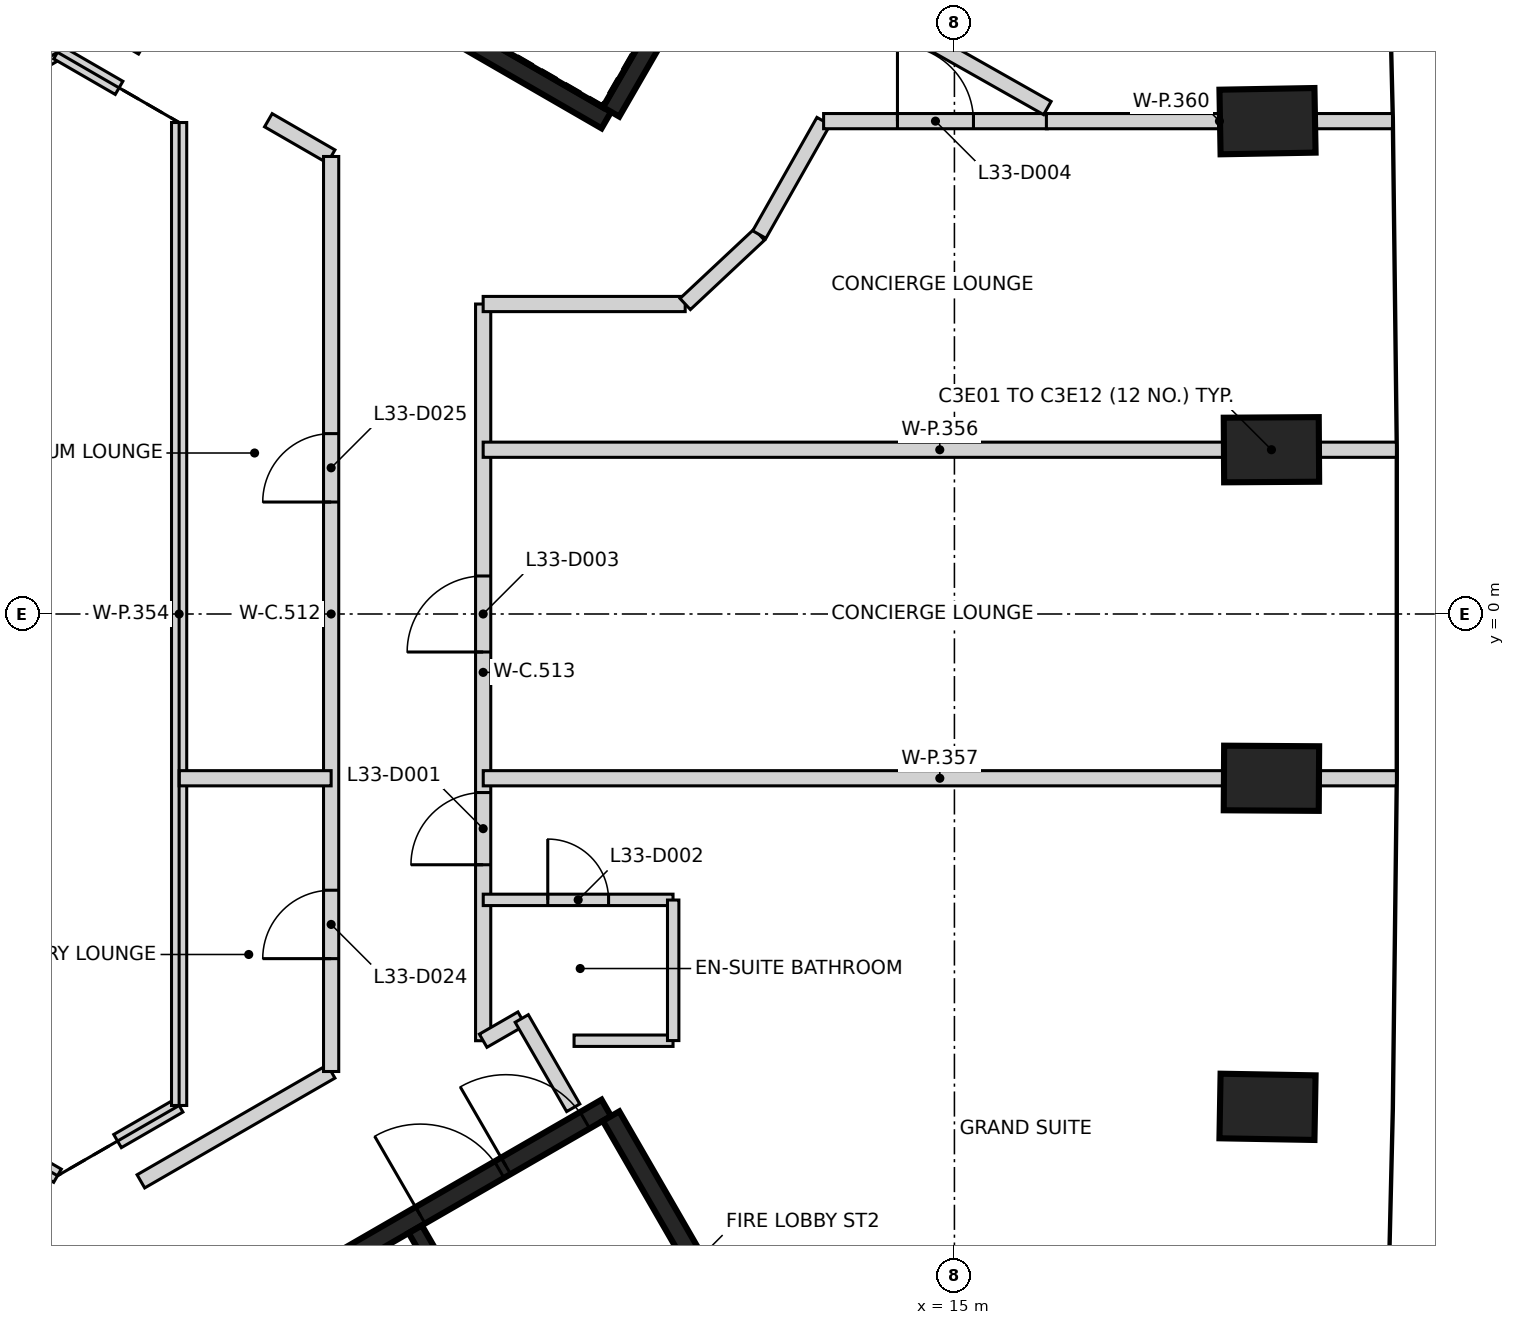
"""IFC4 building model, lengths in metres.
Left out: names, types, materials, properties, quantities, classifications, styles, units other than length and angle.
Written with IfcOpenShell. Run it as: python <this file> out.ifc"""

import sys

from ifc_helpers import new_model, si_unit, direction, frame, frame_2d, origin, origin_2d, place, context, subcontext, project, spatial, rectangle, extrude, element, fill, save


model = new_model("IFC4")
c1 = context("Model", 3, precision=1e-05, world=origin(), true_north=direction((0.0, 1.0)))
c2 = subcontext(c1, "Body", "Model", "MODEL_VIEW")
j1 = project(units=[si_unit("LENGTHUNIT", "METRE"), si_unit("PLANEANGLEUNIT", "RADIAN")], contexts=[c1])
p1 = place(None, origin())
s1 = spatial("IfcSite", under=j1, at=p1, CompositionType="ELEMENT")
p2 = place(p1, origin())
s2 = spatial("IfcBuilding", under=s1, at=p2, CompositionType="ELEMENT")
p3 = place(p2, frame((0.0, 0.0, 136.0)))
s3 = spatial("IfcBuildingStorey", under=s2, at=p3, CompositionType="ELEMENT", Elevation=136.0)
for number, where, z_axis, x_axis in (
    (1, (19.119, -6.484, -0.4), (0.0, 0.0, 1.0), (-1.0, 0.018, 0.0)),
    (2, (19.171, -2.161, -0.4), (0.0, 0.0, 1.0), (-1.0, 0.006, 0.0)),
    (3, (19.171, 2.161, -0.4), (0.0, 0.0, 1.0), (1.0, 0.006, 0.0)),
    (4, (19.119, 6.484, -0.4), (0.0, 0.0, 1.0), (1.0, 0.018, 0.0)),
):
    element("IfcColumn", number, at=place(p3, frame(where, z_axis=z_axis, x_axis=x_axis)), inside=s3, PredefinedType="COLUMN", context=c2, shape_type="SweptSolid", body=[
        extrude(rectangle(XDim=1.25, YDim=0.85, at=origin_2d()), origin(), (0.0, 0.0, 1.0), 3.6),
    ])
p4 = place(p3, frame((10.42, 6.498, 0.0), z_axis=(0.0, 0.0, 1.0), x_axis=(-0.866021906294, 0.500006057782, 0.0)))
e5 = element("IfcWall", 5, at=p4, inside=s3, PredefinedType="SHEAR", context=c2, shape_type="SweptSolid", body=[
    extrude(rectangle(XDim=11.55, YDim=0.25, at=frame_2d((5.775, 0.0))), origin(), (0.0, 0.0, 1.0), 3.2),
])
p5 = place(p4, frame((10.025, 0.0, 0.0)))
e6 = element("IfcOpeningElement", 6, at=p5, cuts=e5, PredefinedType="OPENING", context=c2, shape_type="SweptSolid", body=[
    extrude(rectangle(XDim=1.2, YDim=2.1, at=frame_2d((0.6, 1.05))), frame((0.0, 0.135, 0.0), z_axis=(0.0, -1.0, 0.0), x_axis=(1.0, 0.0, 0.0)), (0.0, 0.0, 1.0), 0.27),
])
p6 = place(p4, frame((8.725, 0.0, 0.0)))
e7 = element("IfcOpeningElement", 7, at=p6, cuts=e5, PredefinedType="OPENING", context=c2, shape_type="SweptSolid", body=[
    extrude(rectangle(XDim=1.2, YDim=2.1, at=frame_2d((0.6, 1.05))), frame((0.0, 0.135, 0.0), z_axis=(0.0, -1.0, 0.0), x_axis=(1.0, 0.0, 0.0)), (0.0, 0.0, 1.0), 0.27),
])
p7 = place(p3, frame((13.238, 11.378, 0.0), z_axis=(0.0, 0.0, 1.0), x_axis=(-0.500008851346, -0.866020293397, 0.0)))
e8 = element("IfcWall", 8, at=p7, inside=s3, PredefinedType="SHEAR", context=c2, shape_type="SweptSolid", body=[
    extrude(rectangle(XDim=5.51, YDim=0.25, at=frame_2d((2.755, 0.0))), origin(), (0.0, 0.0, 1.0), 3.2),
])
p8 = place(p3, frame((0.417, -12.273, 0.0), z_axis=(0.0, 0.0, 1.0), x_axis=(0.866021906294, 0.500006057782, 0.0)))
e9 = element("IfcWall", 9, at=p8, inside=s3, PredefinedType="SHEAR", context=c2, shape_type="SweptSolid", body=[
    extrude(rectangle(XDim=11.55, YDim=0.25, at=frame_2d((5.775, 0.0))), origin(), (0.0, 0.0, 1.0), 3.2),
])
p9 = place(p8, frame((10.025, 0.0, 0.0)))
e10 = element("IfcOpeningElement", 10, at=p9, cuts=e9, PredefinedType="OPENING", context=c2, shape_type="SweptSolid", body=[
    extrude(rectangle(XDim=1.2, YDim=2.1, at=frame_2d((0.6, 1.05))), frame((0.0, 0.135, 0.0), z_axis=(0.0, -1.0, 0.0), x_axis=(1.0, 0.0, 0.0)), (0.0, 0.0, 1.0), 0.27),
])
p10 = place(p8, frame((8.725, 0.0, 0.0)))
e11 = element("IfcOpeningElement", 11, at=p10, cuts=e9, PredefinedType="OPENING", context=c2, shape_type="SweptSolid", body=[
    extrude(rectangle(XDim=1.2, YDim=2.1, at=frame_2d((0.6, 1.05))), frame((0.0, 0.135, 0.0), z_axis=(0.0, -1.0, 0.0), x_axis=(1.0, 0.0, 0.0)), (0.0, 0.0, 1.0), 0.27),
])
p11 = place(p3, frame((10.483, -6.606, 0.0), z_axis=(0.0, 0.0, 1.0), x_axis=(0.49999885962, -0.866026062182, 0.0)))
e12 = element("IfcWall", 12, at=p11, inside=s3, PredefinedType="SHEAR", context=c2, shape_type="SweptSolid", body=[
    extrude(rectangle(XDim=5.225, YDim=0.25, at=frame_2d((2.612, 0.0))), origin(), (0.0, 0.0, 1.0), 3.2),
])
p12 = place(p3, frame((7.906, -8.094, 0.0), z_axis=(0.0, 0.0, 1.0), x_axis=(0.500024287448, -0.866011380966, 0.0)))
e13 = element("IfcWall", 13, at=p12, inside=s3, PredefinedType="SHEAR", context=c2, shape_type="SweptSolid", body=[
    extrude(rectangle(XDim=5.251, YDim=0.2, at=frame_2d((2.625, 0.0))), origin(), (0.0, 0.0, 1.0), 3.2),
])
p13 = place(p12, frame((1.849, 0.0, 0.0)))
e14 = element("IfcOpeningElement", 14, at=p13, cuts=e13, PredefinedType="OPENING", context=c2, shape_type="SweptSolid", body=[
    extrude(rectangle(XDim=1.4, YDim=2.1, at=frame_2d((0.7, 1.05))), frame((0.0, 0.11, 0.0), z_axis=(0.0, -1.0, 0.0), x_axis=(1.0, 0.0, 0.0)), (0.0, 0.0, 1.0), 0.22),
])
p14 = place(p3, frame((1.813, 8.899, 0.0), z_axis=(0.0, 0.0, 1.0), x_axis=(0.865957732194, -0.50011719232, 0.0)))
e15 = element("IfcWall", 15, at=p14, inside=s3, PredefinedType="PARTITIONING", context=c2, shape_type="SweptSolid", body=[
    extrude(rectangle(XDim=2.891, YDim=0.2, at=frame_2d((1.445, 0.0))), origin(), (0.0, 0.0, 1.0), 2.3),
])
p15 = place(p3, frame((4.297, -7.464, 0.0), z_axis=(0.0, 0.0, 1.0), x_axis=(0.86602521942, 0.500000319328, 0.0)))
e16 = element("IfcWall", 16, at=p15, inside=s3, PredefinedType="PARTITIONING", context=c2, shape_type="SweptSolid", body=[
    extrude(rectangle(XDim=2.89, YDim=0.2, at=frame_2d((1.445, 0.0))), origin(), (0.0, 0.0, 1.0), 2.3),
])
p16 = place(p3, frame((5.974, 6.496, 0.0), z_axis=(0.0, 0.0, 1.0), x_axis=(0.865934055563, -0.500158186394, 0.0)))
e17 = element("IfcWall", 17, at=p16, inside=s3, PredefinedType="PARTITIONING", context=c2, shape_type="SweptSolid", body=[
    extrude(rectangle(XDim=0.954, YDim=0.2, at=frame_2d((0.477, 0.0))), origin(), (0.0, 0.0, 1.0), 3.2),
])
p17 = place(p3, frame((6.8, -6.019, 0.0), z_axis=(0.0, 0.0, 1.0), x_axis=(0.0, 1.0, 0.0)))
e18 = element("IfcWall", 18, at=p17, inside=s3, PredefinedType="PARTITIONING", context=c2, shape_type="SweptSolid", body=[
    extrude(rectangle(XDim=12.038, YDim=0.2, at=frame_2d((6.019, 0.0))), origin(), (0.0, 0.0, 1.0), 3.2),
])
p18 = place(p17, frame((1.485, 0.0, 0.0)))
e19 = element("IfcOpeningElement", 19, at=p18, cuts=e18, PredefinedType="OPENING", context=c2, shape_type="SweptSolid", body=[
    extrude(rectangle(XDim=0.9, YDim=2.1, at=frame_2d((0.45, 1.05))), frame((0.0, 0.11, 0.0), z_axis=(0.0, -1.0, 0.0), x_axis=(1.0, 0.0, 0.0)), (0.0, 0.0, 1.0), 0.22),
])
p19 = place(p17, frame((7.492, 0.0, 0.0)))
e20 = element("IfcOpeningElement", 20, at=p19, cuts=e18, PredefinedType="OPENING", context=c2, shape_type="SweptSolid", body=[
    extrude(rectangle(XDim=0.9, YDim=2.1, at=frame_2d((0.45, 1.05))), frame((0.0, 0.11, 0.0), z_axis=(0.0, -1.0, 0.0), x_axis=(1.0, 0.0, 0.0)), (0.0, 0.0, 1.0), 0.22),
])
p20 = place(p3, frame((8.8, -5.614, 0.0), z_axis=(0.0, 0.0, 1.0), x_axis=(0.0, 1.0, 0.0)))
e21 = element("IfcWall", 21, at=p20, inside=s3, PredefinedType="PARTITIONING", context=c2, shape_type="SweptSolid", body=[
    extrude(rectangle(XDim=9.692, YDim=0.2, at=frame_2d((4.846, 0.0))), origin(), (0.0, 0.0, 1.0), 3.2),
])
p21 = place(p20, frame((2.315, 0.0, 0.0)))
e22 = element("IfcOpeningElement", 22, at=p21, cuts=e21, PredefinedType="OPENING", context=c2, shape_type="SweptSolid", body=[
    extrude(rectangle(XDim=0.95, YDim=2.1, at=frame_2d((0.475, 1.05))), frame((0.0, 0.11, 0.0), z_axis=(0.0, -1.0, 0.0), x_axis=(1.0, 0.0, 0.0)), (0.0, 0.0, 1.0), 0.22),
])
p22 = place(p20, frame((5.114, 0.0, 0.0)))
e23 = element("IfcOpeningElement", 23, at=p22, cuts=e21, PredefinedType="OPENING", context=c2, shape_type="SweptSolid", body=[
    extrude(rectangle(XDim=1.0, YDim=2.1, at=frame_2d((0.5, 1.05))), frame((0.0, 0.11, 0.0), z_axis=(0.0, -1.0, 0.0), x_axis=(1.0, 0.0, 0.0)), (0.0, 0.0, 1.0), 0.22),
])
p23 = place(p3, frame((8.8, -5.614, 0.0), z_axis=(0.0, 0.0, 1.0), x_axis=(0.866491166515, 0.499192406143, 0.0)))
e24 = element("IfcWall", 24, at=p23, inside=s3, PredefinedType="PARTITIONING", context=c2, shape_type="SweptSolid", body=[
    extrude(rectangle(XDim=0.585, YDim=0.2, at=frame_2d((0.292, 0.0))), origin(), (0.0, 0.0, 1.0), 3.2),
])
p24 = place(p3, frame((8.8, 4.078, 0.0), z_axis=(0.0, 0.0, 1.0), x_axis=(1.0, 0.0, 0.0)))
e25 = element("IfcWall", 25, at=p24, inside=s3, PredefinedType="PARTITIONING", context=c2, shape_type="SweptSolid", body=[
    extrude(rectangle(XDim=2.658, YDim=0.2, at=frame_2d((1.329, 0.0))), origin(), (0.0, 0.0, 1.0), 3.2),
])
p25 = place(p3, frame((9.308, -5.322, 0.0), z_axis=(0.0, 0.0, 1.0), x_axis=(0.499644515495, -0.866230545603, 0.0)))
e26 = element("IfcWall", 26, at=p25, inside=s3, PredefinedType="PARTITIONING", context=c2, shape_type="SweptSolid", body=[
    extrude(rectangle(XDim=1.356, YDim=0.2, at=frame_2d((0.678, 0.0))), origin(), (0.0, 0.0, 1.0), 3.2),
])
p26 = place(p3, frame((11.458, 4.078, 0.0), z_axis=(0.0, 0.0, 1.0), x_axis=(0.729936032318, 0.683515463412, 0.0)))
e27 = element("IfcWall", 27, at=p26, inside=s3, PredefinedType="PARTITIONING", context=c2, shape_type="SweptSolid", body=[
    extrude(rectangle(XDim=1.336, YDim=0.2, at=frame_2d((0.668, 0.0))), origin(), (0.0, 0.0, 1.0), 3.2),
])
p27 = place(p3, frame((12.433, 4.992, 0.0), z_axis=(0.0, 0.0, 1.0), x_axis=(0.492807777065, 0.870138204462, 0.0)))
e28 = element("IfcWall", 28, at=p27, inside=s3, PredefinedType="PARTITIONING", context=c2, shape_type="SweptSolid", body=[
    extrude(rectangle(XDim=1.715, YDim=0.2, at=frame_2d((0.857, 0.0))), origin(), (0.0, 0.0, 1.0), 3.2),
])
p28 = place(p3, frame((13.279, 6.484, 0.0), z_axis=(0.0, 0.0, 1.0), x_axis=(1.0, 0.0, 0.0)))
e29 = element("IfcWall", 29, at=p28, inside=s3, PredefinedType="PARTITIONING", context=c2, shape_type="SweptSolid", body=[
    extrude(rectangle(XDim=2.943, YDim=0.2, at=frame_2d((1.471, 0.0))), origin(), (0.0, 0.0, 1.0), 3.2),
])
p29 = place(p28, frame((0.971, 0.0, 0.0)))
e30 = element("IfcOpeningElement", 30, at=p29, cuts=e29, PredefinedType="OPENING", context=c2, shape_type="SweptSolid", body=[
    extrude(rectangle(XDim=1.0, YDim=2.1, at=frame_2d((0.5, 1.05))), frame((0.0, 0.11, 0.0), z_axis=(0.0, -1.0, 0.0), x_axis=(1.0, 0.0, 0.0)), (0.0, 0.0, 1.0), 0.22),
])
p30 = place(p3, frame((14.066, 7.876, 0.0), z_axis=(0.0, 0.0, 1.0), x_axis=(0.870423351516, -0.492303960105, 0.0)))
e31 = element("IfcWall", 31, at=p30, inside=s3, PredefinedType="PARTITIONING", context=c2, shape_type="SweptSolid", body=[
    extrude(rectangle(XDim=2.478, YDim=0.2, at=frame_2d((1.239, 0.0))), origin(), (0.0, 0.0, 1.0), 3.2),
])
for number, where, z_axis, x_axis in (
    (32, (-8.0, 0.924, 0.0), (0.0, 0.0, 1.0), (0.866, 0.5, 0.0)),
    (33, (-8.0, -0.924, 0.0), (0.0, 0.0, 1.0), (0.866, -0.5, 0.0)),
):
    element("IfcWall", number, at=place(p3, frame(where, z_axis=z_axis, x_axis=x_axis)), inside=s3, PredefinedType="PARTITIONING", context=c2, shape_type="SweptSolid", body=[
        extrude(rectangle(XDim=12.932, YDim=0.2, at=frame_2d((6.466, 0.0))), origin(), (0.0, 0.0, 1.0), 2.3),
    ])
p31 = place(p3, frame((3.2, 7.39, 0.0), z_axis=(0.0, 0.0, 1.0), x_axis=(0.865985641702, -0.500068863623, 0.0)))
e34 = element("IfcWall", 34, at=p31, inside=s3, PredefinedType="PARTITIONING", context=c2, shape_type="SweptSolid", body=[
    extrude(rectangle(XDim=0.935, YDim=0.2, at=frame_2d((0.468, 0.0))), origin(), (0.0, 0.0, 1.0), 2.3),
])
p32 = place(p3, frame((3.99, -6.934, 0.0), z_axis=(0.0, 0.0, 1.0), x_axis=(0.865872609263, 0.500264554538, 0.0)))
e35 = element("IfcWall", 35, at=p32, inside=s3, PredefinedType="PARTITIONING", context=c2, shape_type="SweptSolid", body=[
    extrude(rectangle(XDim=0.936, YDim=0.2, at=frame_2d((0.468, 0.0))), origin(), (0.0, 0.0, 1.0), 2.3),
])
p33 = place(p3, frame((4.8, -6.466, 0.0), z_axis=(0.0, 0.0, 1.0), x_axis=(0.0, 1.0, 0.0)))
e36 = element("IfcWall", 36, at=p33, inside=s3, PredefinedType="PARTITIONING", context=c2, shape_type="SweptSolid", body=[
    extrude(rectangle(XDim=12.932, YDim=0.2, at=frame_2d((6.466, 0.0))), origin(), (0.0, 0.0, 1.0), 2.3),
])
p34 = place(p3, frame((4.8, -2.161, 0.0), z_axis=(0.0, 0.0, 1.0), x_axis=(1.0, 0.0, 0.0)))
e37 = element("IfcWall", 37, at=p34, inside=s3, PredefinedType="PARTITIONING", context=c2, shape_type="SweptSolid", body=[
    extrude(rectangle(XDim=2.0, YDim=0.2, at=frame_2d((1.0, 0.0))), origin(), (0.0, 0.0, 1.0), 2.3),
])
p35 = place(p3, frame((8.8, 2.161, 0.0), z_axis=(0.0, 0.0, 1.0), x_axis=(1.0, 0.0, 0.0)))
e38 = element("IfcWall", 38, at=p35, inside=s3, PredefinedType="PARTITIONING", context=c2, shape_type="SweptSolid", body=[
    extrude(rectangle(XDim=12.015, YDim=0.2, at=frame_2d((6.007, 0.0))), origin(), (0.0, 0.0, 1.0), 3.2),
])
p36 = place(p3, frame((8.801, -2.161, 0.0), z_axis=(0.0, 0.0, 1.0), x_axis=(1.0, 0.0, 0.0)))
e39 = element("IfcWall", 39, at=p36, inside=s3, PredefinedType="PARTITIONING", context=c2, shape_type="SweptSolid", body=[
    extrude(rectangle(XDim=12.014, YDim=0.2, at=frame_2d((6.007, 0.0))), origin(), (0.0, 0.0, 1.0), 3.2),
])
p37 = place(p3, frame((16.21, 6.484, 0.0), z_axis=(0.0, 0.0, 1.0), x_axis=(1.0, 0.0, 0.0)))
e40 = element("IfcWall", 40, at=p37, inside=s3, PredefinedType="PARTITIONING", context=c2, shape_type="SweptSolid", body=[
    extrude(rectangle(XDim=4.553, YDim=0.2, at=frame_2d((2.277, 0.0))), origin(), (0.0, 0.0, 1.0), 3.2),
])
p38 = place(p3, frame((8.801, -3.761, 0.0), z_axis=(0.0, 0.0, 1.0), x_axis=(1.0, 0.0, 0.0)))
e41 = element("IfcWall", 41, at=p38, inside=s3, PredefinedType="PARTITIONING", context=c2, shape_type="SweptSolid", body=[
    extrude(rectangle(XDim=2.497, YDim=0.15, at=frame_2d((1.249, 0.0))), origin(), (0.0, 0.0, 1.0), 3.2),
])
p39 = place(p38, frame((0.849, 0.0, 0.0)))
e42 = element("IfcOpeningElement", 42, at=p39, cuts=e41, PredefinedType="OPENING", context=c2, shape_type="SweptSolid", body=[
    extrude(rectangle(XDim=0.8, YDim=2.1, at=frame_2d((0.4, 1.05))), frame((0.0, 0.085, 0.0), z_axis=(0.0, -1.0, 0.0), x_axis=(1.0, 0.0, 0.0)), (0.0, 0.0, 1.0), 0.17),
])
p40 = place(p3, frame((11.298, -5.614, 0.0), z_axis=(0.0, 0.0, 1.0), x_axis=(-1.0, 0.0, 0.0)))
e43 = element("IfcWall", 43, at=p40, inside=s3, PredefinedType="PARTITIONING", context=c2, shape_type="SweptSolid", body=[
    extrude(rectangle(XDim=1.302, YDim=0.15, at=frame_2d((0.651, 0.0))), origin(), (0.0, 0.0, 1.0), 3.2),
])
p41 = place(p3, frame((11.3, -5.612, 0.0), z_axis=(0.0, 0.0, 1.0), x_axis=(0.0, 1.0, 0.0)))
e44 = element("IfcWall", 44, at=p41, inside=s3, PredefinedType="PARTITIONING", context=c2, shape_type="SweptSolid", body=[
    extrude(rectangle(XDim=1.849, YDim=0.15, at=frame_2d((0.925, 0.0))), origin(), (0.0, 0.0, 1.0), 3.2),
])
p42 = place(p9, origin())
e45 = element("IfcDoor", 45, at=p42, inside=s3, OperationType="SINGLE_SWING_LEFT", PredefinedType="DOOR", context=c2, shape_type="SweptSolid", body=[
    extrude(rectangle(XDim=1.2, YDim=2.1, at=frame_2d((0.6, 1.05))), frame((0.0, 0.025, 0.0), z_axis=(0.0, -1.0, 0.0), x_axis=(1.0, 0.0, 0.0)), (0.0, 0.0, 1.0), 0.05),
])
fill(e10, e45)
p43 = place(p10, origin())
e46 = element("IfcDoor", 46, at=p43, inside=s3, OperationType="SINGLE_SWING_RIGHT", PredefinedType="DOOR", context=c2, shape_type="SweptSolid", body=[
    extrude(rectangle(XDim=1.2, YDim=2.1, at=frame_2d((0.6, 1.05))), frame((0.0, 0.025, 0.0), z_axis=(0.0, -1.0, 0.0), x_axis=(1.0, 0.0, 0.0)), (0.0, 0.0, 1.0), 0.05),
])
fill(e11, e46)
p44 = place(p21, frame((0.95, 0.0, 0.0), z_axis=(0.0, 0.0, 1.0), x_axis=(-1.0, 0.0, 0.0)))
e47 = element("IfcDoor", 47, at=p44, inside=s3, OperationType="SINGLE_SWING_LEFT", PredefinedType="DOOR", context=c2, shape_type="SweptSolid", body=[
    extrude(rectangle(XDim=0.95, YDim=2.1, at=frame_2d((0.475, 1.05))), frame((0.0, 0.025, 0.0), z_axis=(0.0, -1.0, 0.0), x_axis=(1.0, 0.0, 0.0)), (0.0, 0.0, 1.0), 0.05),
])
fill(e22, e47)
p45 = place(p39, frame((0.8, 0.0, 0.0), z_axis=(0.0, 0.0, 1.0), x_axis=(-1.0, 0.0, 0.0)))
e48 = element("IfcDoor", 48, at=p45, inside=s3, OperationType="SINGLE_SWING_LEFT", PredefinedType="DOOR", context=c2, shape_type="SweptSolid", body=[
    extrude(rectangle(XDim=0.8, YDim=2.1, at=frame_2d((0.4, 1.05))), frame((0.0, 0.025, 0.0), z_axis=(0.0, -1.0, 0.0), x_axis=(1.0, 0.0, 0.0)), (0.0, 0.0, 1.0), 0.05),
])
fill(e42, e48)
p46 = place(p22, frame((1.0, 0.0, 0.0), z_axis=(0.0, 0.0, 1.0), x_axis=(-1.0, 0.0, 0.0)))
e49 = element("IfcDoor", 49, at=p46, inside=s3, OperationType="SINGLE_SWING_LEFT", PredefinedType="DOOR", context=c2, shape_type="SweptSolid", body=[
    extrude(rectangle(XDim=1.0, YDim=2.1, at=frame_2d((0.5, 1.05))), frame((0.0, 0.025, 0.0), z_axis=(0.0, -1.0, 0.0), x_axis=(1.0, 0.0, 0.0)), (0.0, 0.0, 1.0), 0.05),
])
fill(e23, e49)
p47 = place(p29, frame((1.0, 0.0, 0.0), z_axis=(0.0, 0.0, 1.0), x_axis=(-1.0, 0.0, 0.0)))
e50 = element("IfcDoor", 50, at=p47, inside=s3, OperationType="SINGLE_SWING_LEFT", PredefinedType="DOOR", context=c2, shape_type="SweptSolid", body=[
    extrude(rectangle(XDim=1.0, YDim=2.1, at=frame_2d((0.5, 1.05))), frame((0.0, 0.025, 0.0), z_axis=(0.0, -1.0, 0.0), x_axis=(1.0, 0.0, 0.0)), (0.0, 0.0, 1.0), 0.05),
])
fill(e30, e50)
p48 = place(p18, origin())
e51 = element("IfcDoor", 51, at=p48, inside=s3, OperationType="SINGLE_SWING_LEFT", PredefinedType="DOOR", context=c2, shape_type="SweptSolid", body=[
    extrude(rectangle(XDim=0.9, YDim=2.1, at=frame_2d((0.45, 1.05))), frame((0.0, 0.025, 0.0), z_axis=(0.0, -1.0, 0.0), x_axis=(1.0, 0.0, 0.0)), (0.0, 0.0, 1.0), 0.05),
])
fill(e19, e51)
p49 = place(p19, origin())
e52 = element("IfcDoor", 52, at=p49, inside=s3, OperationType="SINGLE_SWING_LEFT", PredefinedType="DOOR", context=c2, shape_type="SweptSolid", body=[
    extrude(rectangle(XDim=0.9, YDim=2.1, at=frame_2d((0.45, 1.05))), frame((0.0, 0.025, 0.0), z_axis=(0.0, -1.0, 0.0), x_axis=(1.0, 0.0, 0.0)), (0.0, 0.0, 1.0), 0.05),
])
fill(e20, e52)
save(model, sys.argv[1])
